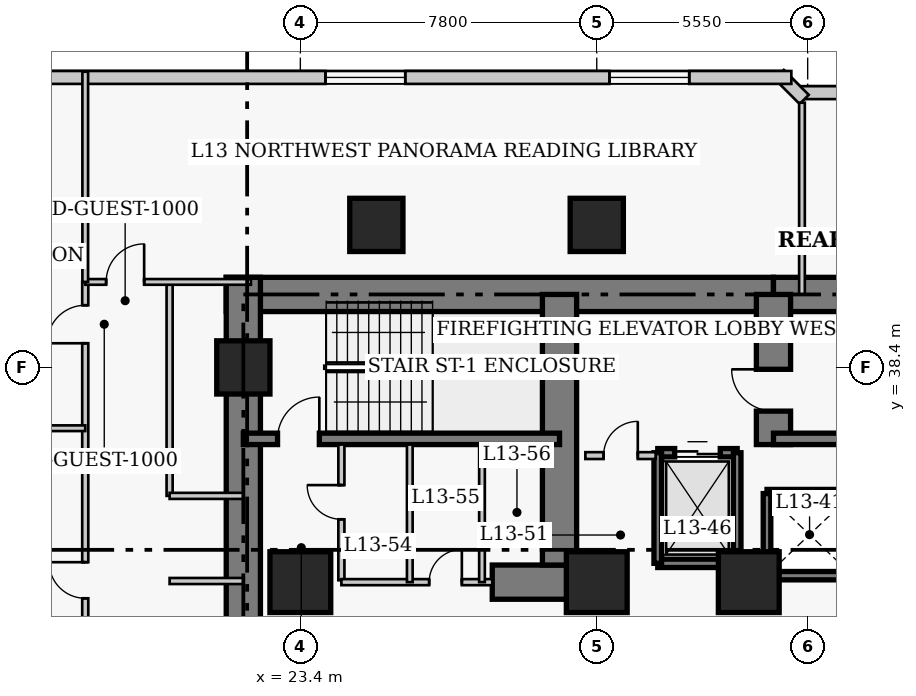
"""IFC4 building model, lengths in metres.
Left out: names, types, materials, properties, quantities, classifications, styles, units other than length and angle.
Written with IfcOpenShell. Run it as: python <this file> out.ifc"""

import sys

from ifc_helpers import new_model, si_unit, direction, frame, frame_2d, origin, origin_2d, place, context, subcontext, project, spatial, rectangle, extrude, element, fill, save


model = new_model("IFC4")
c1 = context("Model", 3, precision=1e-05, world=origin(), true_north=direction((0.0, 1.0)))
c2 = subcontext(c1, "Body", "Model", "MODEL_VIEW")
j1 = project(units=[si_unit("LENGTHUNIT", "METRE"), si_unit("PLANEANGLEUNIT", "RADIAN")], contexts=[c1])
p1 = place(None, origin())
s1 = spatial("IfcSite", under=j1, at=p1, CompositionType="ELEMENT")
p2 = place(p1, origin())
s2 = spatial("IfcBuilding", under=s1, at=p2, CompositionType="ELEMENT")
p3 = place(p2, frame((0.0, 0.0, 56.4)))
s3 = spatial("IfcBuildingStorey", under=s2, at=p3, CompositionType="ELEMENT", Elevation=56.4)
p4 = place(p3, frame((21.45, 40.32, 0.0), z_axis=(0.0, 0.0, 1.0), x_axis=(1.0, 0.0, 0.0)))
e1 = element("IfcWall", 1, at=p4, inside=s3, PredefinedType="SHEAR", context=c2, shape_type="SweptSolid", body=[
    extrude(rectangle(XDim=14.4, YDim=0.9, at=frame_2d((7.2, 0.0))), origin(), (0.0, 0.0, 1.0), 3.8),
])
p5 = place(p3, frame((35.85, 40.32, 0.0), z_axis=(0.0, 0.0, 1.0), x_axis=(1.0, 0.0, 0.0)))
e2 = element("IfcWall", 2, at=p5, inside=s3, PredefinedType="SHEAR", context=c2, shape_type="SweptSolid", body=[
    extrude(rectangle(XDim=12.6, YDim=0.9, at=frame_2d((6.3, 0.0))), origin(), (0.0, 0.0, 1.0), 3.8),
])
p6 = place(p3, frame((21.9, 27.05, 0.0), z_axis=(0.0, 0.0, 1.0), x_axis=(0.0, 1.0, 0.0)))
e3 = element("IfcWall", 3, at=p6, inside=s3, PredefinedType="SHEAR", context=c2, shape_type="SweptSolid", body=[
    extrude(rectangle(XDim=13.72, YDim=0.9, at=frame_2d((6.86, 0.0))), origin(), (0.0, 0.0, 1.0), 3.8),
])
p7 = place(p3, frame((28.45, 32.75, 0.0), z_axis=(0.0, 0.0, 1.0), x_axis=(1.0, 0.0, 0.0)))
e4 = element("IfcWall", 4, at=p7, inside=s3, PredefinedType="SHEAR", context=c2, shape_type="SweptSolid", body=[
    extrude(rectangle(XDim=2.4, YDim=0.9, at=frame_2d((1.2, 0.0))), origin(), (0.0, 0.0, 1.0), 3.8),
])
p8 = place(p3, frame((30.22, 33.2, 0.0), z_axis=(0.0, 0.0, 1.0), x_axis=(0.0, 1.0, 0.0)))
e5 = element("IfcWall", 5, at=p8, inside=s3, PredefinedType="SHEAR", context=c2, shape_type="SweptSolid", body=[
    extrude(rectangle(XDim=7.12, YDim=0.9, at=frame_2d((3.56, 0.0))), origin(), (0.0, 0.0, 1.0), 3.8),
])
p9 = place(p3, frame((35.85, 36.37, 0.0), z_axis=(0.0, 0.0, 1.0), x_axis=(0.0, 1.0, 0.0)))
e6 = element("IfcWall", 6, at=p9, inside=s3, PredefinedType="SHEAR", context=c2, shape_type="SweptSolid", body=[
    extrude(rectangle(XDim=3.95, YDim=0.9, at=frame_2d((1.975, 0.0))), origin(), (0.0, 0.0, 1.0), 3.8),
])
p10 = place(p9, frame((0.88, 0.0, 0.0)))
e7 = element("IfcOpeningElement", 7, at=p10, cuts=e6, PredefinedType="OPENING", context=c2, shape_type="SweptSolid", body=[
    extrude(rectangle(XDim=1.1, YDim=2.15, at=frame_2d((0.55, 1.075))), frame((0.0, 0.46, 0.0), z_axis=(0.0, -1.0, 0.0), x_axis=(1.0, 0.0, 0.0)), (0.0, 0.0, 1.0), 0.92),
])
p11 = place(p3, frame((21.9, 36.52, 0.0), z_axis=(0.0, 0.0, 1.0), x_axis=(1.0, 0.0, 0.0)))
e8 = element("IfcWall", 8, at=p11, inside=s3, PredefinedType="SHEAR", context=c2, shape_type="SweptSolid", body=[
    extrude(rectangle(XDim=8.32, YDim=0.3, at=frame_2d((4.16, 0.0))), origin(), (0.0, 0.0, 1.0), 3.8),
])
p12 = place(p11, frame((0.9, 0.0, 0.0)))
e9 = element("IfcOpeningElement", 9, at=p12, cuts=e8, PredefinedType="OPENING", context=c2, shape_type="SweptSolid", body=[
    extrude(rectangle(XDim=1.1, YDim=2.15, at=frame_2d((0.55, 1.075))), frame((0.0, 0.16, 0.0), z_axis=(0.0, -1.0, 0.0), x_axis=(1.0, 0.0, 0.0)), (0.0, 0.0, 1.0), 0.32),
])
p13 = place(p3, frame((35.85, 36.52, 0.0), z_axis=(0.0, 0.0, 1.0), x_axis=(1.0, 0.0, 0.0)))
e10 = element("IfcWall", 10, at=p13, inside=s3, PredefinedType="SHEAR", context=c2, shape_type="SweptSolid", body=[
    extrude(rectangle(XDim=8.33, YDim=0.3, at=frame_2d((4.165, 0.0))), origin(), (0.0, 0.0, 1.0), 3.8),
])
p14 = place(p3, frame((21.9, 38.4, 0.0), z_axis=(0.0, 0.0, 1.0), x_axis=(1.0, 0.0, 0.0)))
e11 = element("IfcColumn", 11, at=p14, inside=s3, PredefinedType="COLUMN", context=c2, shape_type="SweptSolid", body=[
    extrude(rectangle(XDim=1.4, YDim=1.4, at=origin_2d()), origin(), (0.0, 0.0, 1.0), 3.8),
])
for number, where, z_axis, x_axis in (
    (12, (23.4, 32.75, 0.0), (0.0, 0.0, 1.0), (1.0, 0.0, 0.0)),
    (13, (31.2, 32.75, 0.0), (0.0, 0.0, 1.0), (1.0, 0.0, 0.0)),
    (14, (35.2, 32.75, 0.0), (0.0, 0.0, 1.0), (1.0, 0.0, 0.0)),
):
    element("IfcColumn", number, at=place(p3, frame(where, z_axis=z_axis, x_axis=x_axis)), inside=s3, PredefinedType="COLUMN", context=c2, shape_type="SweptSolid", body=[
        extrude(rectangle(XDim=1.6, YDim=1.6, at=origin_2d()), origin(), (0.0, 0.0, 1.0), 3.8),
    ])
for number, where, z_axis, x_axis in (
    (15, (25.4, 42.15, 0.0), (0.0, 0.0, 1.0), (1.0, 0.0, 0.0)),
    (16, (31.2, 42.15, 0.0), (0.0, 0.0, 1.0), (1.0, 0.0, 0.0)),
):
    element("IfcColumn", number, at=place(p3, frame(where, z_axis=z_axis, x_axis=x_axis)), inside=s3, PredefinedType="COLUMN", context=c2, shape_type="SweptSolid", body=[
        extrude(rectangle(XDim=1.4, YDim=1.4, at=origin_2d()), origin(), (0.0, 0.0, 1.0), 3.8),
    ])
p15 = place(p3, frame((41.42, 45.63, 0.0), z_axis=(0.0, 0.0, 1.0), x_axis=(-1.0, 0.0, 0.0)))
e17 = element("IfcWall", 17, at=p15, inside=s3, PredefinedType="SOLIDWALL", context=c2, shape_type="SweptSolid", body=[
    extrude(rectangle(XDim=4.84, YDim=0.34, at=frame_2d((2.42, 0.0))), origin(), (0.0, 0.0, 1.0), 3.54),
])
p16 = place(p15, frame((1.37, 0.0, 0.85)))
e18 = element("IfcOpeningElement", 18, at=p16, cuts=e17, PredefinedType="OPENING", context=c2, shape_type="SweptSolid", body=[
    extrude(rectangle(XDim=2.1, YDim=1.85, at=frame_2d((1.05, 0.925))), frame((0.0, 0.18, 0.0), z_axis=(0.0, -1.0, 0.0), x_axis=(1.0, 0.0, 0.0)), (0.0, 0.0, 1.0), 0.36),
])
p17 = place(p3, frame((36.658, 45.451, 0.0), z_axis=(0.0, 0.0, 1.0), x_axis=(-0.707106781187, 0.707106781187, 0.0)))
e19 = element("IfcWall", 19, at=p17, inside=s3, PredefinedType="SOLIDWALL", context=c2, shape_type="SweptSolid", body=[
    extrude(rectangle(XDim=0.929, YDim=0.34, at=frame_2d((0.464, 0.0))), origin(), (0.0, 0.0, 1.0), 3.54),
])
p18 = place(p3, frame((36.32, 46.03, 0.0), z_axis=(0.0, 0.0, 1.0), x_axis=(-1.0, 0.0, 0.0)))
e20 = element("IfcWall", 20, at=p18, inside=s3, PredefinedType="SOLIDWALL", context=c2, shape_type="SweptSolid", body=[
    extrude(rectangle(XDim=29.89, YDim=0.34, at=frame_2d((14.945, 0.0))), origin(), (0.0, 0.0, 1.0), 3.54),
])
p19 = place(p18, frame((2.686, 0.0, 0.85)))
e21 = element("IfcOpeningElement", 21, at=p19, cuts=e20, PredefinedType="OPENING", context=c2, shape_type="SweptSolid", body=[
    extrude(rectangle(XDim=2.1, YDim=1.85, at=frame_2d((1.05, 0.925))), frame((0.0, 0.18, 0.0), z_axis=(0.0, -1.0, 0.0), x_axis=(1.0, 0.0, 0.0)), (0.0, 0.0, 1.0), 0.36),
])
p20 = place(p18, frame((10.159, 0.0, 0.85)))
e22 = element("IfcOpeningElement", 22, at=p20, cuts=e20, PredefinedType="OPENING", context=c2, shape_type="SweptSolid", body=[
    extrude(rectangle(XDim=2.1, YDim=1.85, at=frame_2d((1.05, 0.925))), frame((0.0, 0.18, 0.0), z_axis=(0.0, -1.0, 0.0), x_axis=(1.0, 0.0, 0.0)), (0.0, 0.0, 1.0), 0.36),
])
p21 = place(p18, frame((25.104, 0.0, 0.85)))
e23 = element("IfcOpeningElement", 23, at=p21, cuts=e20, PredefinedType="OPENING", context=c2, shape_type="SweptSolid", body=[
    extrude(rectangle(XDim=2.1, YDim=1.85, at=frame_2d((1.05, 0.925))), frame((0.0, 0.18, 0.0), z_axis=(0.0, -1.0, 0.0), x_axis=(1.0, 0.0, 0.0)), (0.0, 0.0, 1.0), 0.36),
])
for number, where, z_axis, x_axis in (
    (24, (35.68, 35.08, 0.0), (0.0, 0.0, 1.0), (1.0, 0.0, 0.0)),
    (25, (35.68, 32.92, 0.0), (0.0, 0.0, 1.0), (1.0, 0.0, 0.0)),
):
    element("IfcWall", number, at=place(p3, frame(where, z_axis=z_axis, x_axis=x_axis)), inside=s3, PredefinedType="SHEAR", context=c2, shape_type="SweptSolid", body=[
        extrude(rectangle(XDim=2.32, YDim=0.22, at=frame_2d((1.16, 0.0))), origin(), (0.0, 0.0, 1.0), 3.8),
    ])
p22 = place(p3, frame((35.68, 32.92, 0.0), z_axis=(0.0, 0.0, 1.0), x_axis=(0.0, 1.0, 0.0)))
e26 = element("IfcWall", 26, at=p22, inside=s3, PredefinedType="SHEAR", context=c2, shape_type="SweptSolid", body=[
    extrude(rectangle(XDim=2.16, YDim=0.2, at=frame_2d((1.08, 0.0))), origin(), (0.0, 0.0, 1.0), 3.8),
])
p23 = place(p3, frame((32.805, 36.155, 0.0), z_axis=(0.0, 0.0, 1.0), x_axis=(1.0, 0.0, 0.0)))
e27 = element("IfcWall", 27, at=p23, inside=s3, PredefinedType="SHEAR", context=c2, shape_type="SweptSolid", body=[
    extrude(rectangle(XDim=2.09, YDim=0.22, at=frame_2d((1.045, 0.0))), origin(), (0.0, 0.0, 1.0), 3.8),
])
p24 = place(p23, frame((0.445, 0.0, 0.0)))
e28 = element("IfcOpeningElement", 28, at=p24, cuts=e27, PredefinedType="OPENING", context=c2, shape_type="SweptSolid", body=[
    extrude(rectangle(XDim=1.2, YDim=2.15, at=frame_2d((0.6, 1.075))), frame((0.0, 0.12, 0.0), z_axis=(0.0, -1.0, 0.0), x_axis=(1.0, 0.0, 0.0)), (0.0, 0.0, 1.0), 0.24),
])
p25 = place(p3, frame((32.805, 33.245, 0.0), z_axis=(0.0, 0.0, 1.0), x_axis=(1.0, 0.0, 0.0)))
e29 = element("IfcWall", 29, at=p25, inside=s3, PredefinedType="SHEAR", context=c2, shape_type="SweptSolid", body=[
    extrude(rectangle(XDim=2.09, YDim=0.22, at=frame_2d((1.045, 0.0))), origin(), (0.0, 0.0, 1.0), 3.8),
])
for number, where, z_axis, x_axis in (
    (30, (32.805, 33.245, 0.0), (0.0, 0.0, 1.0), (0.0, 1.0, 0.0)),
    (31, (34.895, 33.245, 0.0), (0.0, 0.0, 1.0), (0.0, 1.0, 0.0)),
):
    element("IfcWall", number, at=place(p3, frame(where, z_axis=z_axis, x_axis=x_axis)), inside=s3, PredefinedType="SHEAR", context=c2, shape_type="SweptSolid", body=[
        extrude(rectangle(XDim=2.91, YDim=0.2, at=frame_2d((1.455, 0.0))), origin(), (0.0, 0.0, 1.0), 3.8),
    ])
p26 = place(p3, frame((30.9, 36.08, 0.0), z_axis=(0.0, 0.0, 1.0), x_axis=(1.0, 0.0, 0.0)))
e32 = element("IfcWall", 32, at=p26, inside=s3, PredefinedType="PARTITIONING", context=c2, shape_type="SweptSolid", body=[
    extrude(rectangle(XDim=1.85, YDim=0.18, at=frame_2d((0.925, 0.0))), origin(), (0.0, 0.0, 1.0), 3.54),
])
p27 = place(p26, frame((0.48, 0.0, 0.0)))
e33 = element("IfcOpeningElement", 33, at=p27, cuts=e32, PredefinedType="OPENING", context=c2, shape_type="SweptSolid", body=[
    extrude(rectangle(XDim=0.9, YDim=2.15, at=frame_2d((0.45, 1.075))), frame((0.0, 0.1, 0.0), z_axis=(0.0, -1.0, 0.0), x_axis=(1.0, 0.0, 0.0)), (0.0, 0.0, 1.0), 0.2),
])
p28 = place(p3, frame((24.48, 32.8, 0.0), z_axis=(0.0, 0.0, 1.0), x_axis=(0.0, 1.0, 0.0)))
e34 = element("IfcWall", 34, at=p28, inside=s3, PredefinedType="PARTITIONING", context=c2, shape_type="SweptSolid", body=[
    extrude(rectangle(XDim=3.57, YDim=0.16, at=frame_2d((1.785, 0.0))), origin(), (0.0, 0.0, 1.0), 3.54),
])
p29 = place(p28, frame((1.604, 0.0, 0.0)))
e35 = element("IfcOpeningElement", 35, at=p29, cuts=e34, PredefinedType="OPENING", context=c2, shape_type="SweptSolid", body=[
    extrude(rectangle(XDim=0.9, YDim=2.1, at=frame_2d((0.45, 1.05))), frame((0.0, 0.09, 0.0), z_axis=(0.0, -1.0, 0.0), x_axis=(1.0, 0.0, 0.0)), (0.0, 0.0, 1.0), 0.18),
])
p30 = place(p3, frame((24.48, 32.75, 0.0), z_axis=(0.0, 0.0, 1.0), x_axis=(1.0, 0.0, 0.0)))
e36 = element("IfcWall", 36, at=p30, inside=s3, PredefinedType="PARTITIONING", context=c2, shape_type="SweptSolid", body=[
    extrude(rectangle(XDim=3.97, YDim=0.16, at=frame_2d((1.985, 0.0))), origin(), (0.0, 0.0, 1.0), 3.54),
])
p31 = place(p30, frame((2.31, 0.0, 0.0)))
e37 = element("IfcOpeningElement", 37, at=p31, cuts=e36, PredefinedType="OPENING", context=c2, shape_type="SweptSolid", body=[
    extrude(rectangle(XDim=0.86, YDim=2.05, at=frame_2d((0.43, 1.025))), frame((0.0, 0.09, 0.0), z_axis=(0.0, -1.0, 0.0), x_axis=(1.0, 0.0, 0.0)), (0.0, 0.0, 1.0), 0.18),
])
for number, where, z_axis, x_axis in (
    (38, (26.28, 32.75, 0.0), (0.0, 0.0, 1.0), (0.0, 1.0, 0.0)),
    (39, (28.18, 32.75, 0.0), (0.0, 0.0, 1.0), (0.0, 1.0, 0.0)),
):
    element("IfcWall", number, at=place(p3, frame(where, z_axis=z_axis, x_axis=x_axis)), inside=s3, PredefinedType="PARTITIONING", context=c2, shape_type="SweptSolid", body=[
        extrude(rectangle(XDim=3.62, YDim=0.15, at=frame_2d((1.81, 0.0))), origin(), (0.0, 0.0, 1.0), 3.54),
    ])
p32 = place(p3, frame((17.74, 5.05, 0.0), z_axis=(0.0, 0.0, 1.0), x_axis=(0.0, 1.0, 0.0)))
e40 = element("IfcWall", 40, at=p32, inside=s3, PredefinedType="PARTITIONING", context=c2, shape_type="SweptSolid", body=[
    extrude(rectangle(XDim=35.6, YDim=0.16, at=frame_2d((17.8, 0.0))), origin(), (0.0, 0.0, 1.0), 3.54),
])
p33 = place(p32, frame((2.6, 0.0, 0.0)))
e41 = element("IfcOpeningElement", 41, at=p33, cuts=e40, PredefinedType="OPENING", context=c2, shape_type="SweptSolid", body=[
    extrude(rectangle(XDim=0.95, YDim=2.1, at=frame_2d((0.475, 1.05))), frame((0.0, 0.09, 0.0), z_axis=(0.0, -1.0, 0.0), x_axis=(1.0, 0.0, 0.0)), (0.0, 0.0, 1.0), 0.18),
])
p34 = place(p32, frame((10.075, 0.0, 0.0)))
e42 = element("IfcOpeningElement", 42, at=p34, cuts=e40, PredefinedType="OPENING", context=c2, shape_type="SweptSolid", body=[
    extrude(rectangle(XDim=0.95, YDim=2.1, at=frame_2d((0.475, 1.05))), frame((0.0, 0.09, 0.0), z_axis=(0.0, -1.0, 0.0), x_axis=(1.0, 0.0, 0.0)), (0.0, 0.0, 1.0), 0.18),
])
p35 = place(p32, frame((18.875, 0.0, 0.0)))
e43 = element("IfcOpeningElement", 43, at=p35, cuts=e40, PredefinedType="OPENING", context=c2, shape_type="SweptSolid", body=[
    extrude(rectangle(XDim=0.95, YDim=2.1, at=frame_2d((0.475, 1.05))), frame((0.0, 0.09, 0.0), z_axis=(0.0, -1.0, 0.0), x_axis=(1.0, 0.0, 0.0)), (0.0, 0.0, 1.0), 0.18),
])
p36 = place(p32, frame((27.275, 0.0, 0.0)))
e44 = element("IfcOpeningElement", 44, at=p36, cuts=e40, PredefinedType="OPENING", context=c2, shape_type="SweptSolid", body=[
    extrude(rectangle(XDim=0.95, YDim=2.1, at=frame_2d((0.475, 1.05))), frame((0.0, 0.09, 0.0), z_axis=(0.0, -1.0, 0.0), x_axis=(1.0, 0.0, 0.0)), (0.0, 0.0, 1.0), 0.18),
])
p37 = place(p32, frame((33.986, 0.0, 0.0)))
e45 = element("IfcOpeningElement", 45, at=p37, cuts=e40, PredefinedType="OPENING", context=c2, shape_type="SweptSolid", body=[
    extrude(rectangle(XDim=1.0, YDim=2.15, at=frame_2d((0.5, 1.075))), frame((0.0, 0.09, 0.0), z_axis=(0.0, -1.0, 0.0), x_axis=(1.0, 0.0, 0.0)), (0.0, 0.0, 1.0), 0.18),
])
p38 = place(p3, frame((19.96, 35.02, 0.0), z_axis=(0.0, 0.0, 1.0), x_axis=(0.0, 1.0, 0.0)))
e46 = element("IfcWall", 46, at=p38, inside=s3, PredefinedType="PARTITIONING", context=c2, shape_type="SweptSolid", body=[
    extrude(rectangle(XDim=5.63, YDim=0.16, at=frame_2d((2.815, 0.0))), origin(), (0.0, 0.0, 1.0), 3.54),
])
for number, where, z_axis, x_axis in (
    (47, (19.96, 35.02, 0.0), (0.0, 0.0, 1.0), (1.0, 0.0, 0.0)),
    (48, (19.96, 32.78, 0.0), (0.0, 0.0, 1.0), (1.0, 0.0, 0.0)),
):
    element("IfcWall", number, at=place(p3, frame(where, z_axis=z_axis, x_axis=x_axis)), inside=s3, PredefinedType="PARTITIONING", context=c2, shape_type="SweptSolid", body=[
        extrude(rectangle(XDim=1.94, YDim=0.16, at=frame_2d((0.97, 0.0))), origin(), (0.0, 0.0, 1.0), 3.54),
    ])
p39 = place(p3, frame((17.74, 40.65, 0.0), z_axis=(0.0, 0.0, 1.0), x_axis=(1.0, 0.0, 0.0)))
e49 = element("IfcWall", 49, at=p39, inside=s3, PredefinedType="PARTITIONING", context=c2, shape_type="SweptSolid", body=[
    extrude(rectangle(XDim=4.36, YDim=0.15, at=frame_2d((2.18, 0.0))), origin(), (0.0, 0.0, 1.0), 3.54),
])
p40 = place(p39, frame((0.55, 0.0, 0.0)))
e50 = element("IfcOpeningElement", 50, at=p40, cuts=e49, PredefinedType="OPENING", context=c2, shape_type="SweptSolid", body=[
    extrude(rectangle(XDim=1.0, YDim=2.15, at=frame_2d((0.5, 1.075))), frame((0.0, 0.085, 0.0), z_axis=(0.0, -1.0, 0.0), x_axis=(1.0, 0.0, 0.0)), (0.0, 0.0, 1.0), 0.17),
])
p41 = place(p3, frame((17.74, 40.65, 0.0), z_axis=(0.0, 0.0, 1.0), x_axis=(0.0, 1.0, 0.0)))
e51 = element("IfcWall", 51, at=p41, inside=s3, PredefinedType="PARTITIONING", context=c2, shape_type="SweptSolid", body=[
    extrude(rectangle(XDim=5.53, YDim=0.15, at=frame_2d((2.765, 0.0))), origin(), (0.0, 0.0, 1.0), 3.54),
])
p42 = place(p3, frame((36.6, 40.32, 0.0), z_axis=(0.0, 0.0, 1.0), x_axis=(0.0, 1.0, 0.0)))
e52 = element("IfcWall", 52, at=p42, inside=s3, PredefinedType="PARTITIONING", context=c2, shape_type="SweptSolid", body=[
    extrude(rectangle(XDim=5.045, YDim=0.15, at=frame_2d((2.522, 0.0))), origin(), (0.0, 0.0, 1.0), 3.54),
])
p43 = place(p3, frame((14.45, 36.8, 0.0), z_axis=(0.0, 0.0, 1.0), x_axis=(1.0, 0.0, 0.0)))
e53 = element("IfcWall", 53, at=p43, inside=s3, PredefinedType="PARTITIONING", context=c2, shape_type="SweptSolid", body=[
    extrude(rectangle(XDim=3.29, YDim=0.15, at=frame_2d((1.645, 0.0))), origin(), (0.0, 0.0, 1.0), 3.54),
])
p44 = place(p19, origin())
e54 = element("IfcWindow", 54, at=p44, inside=s3, PartitioningType="SINGLE_PANEL", PredefinedType="WINDOW", context=c2, shape_type="SweptSolid", body=[
    extrude(rectangle(XDim=2.1, YDim=1.85, at=frame_2d((1.05, 0.925))), frame((0.0, 0.03, 0.0), z_axis=(0.0, -1.0, 0.0), x_axis=(1.0, 0.0, 0.0)), (0.0, 0.0, 1.0), 0.06),
])
fill(e21, e54)
p45 = place(p20, origin())
e55 = element("IfcWindow", 55, at=p45, inside=s3, PartitioningType="SINGLE_PANEL", PredefinedType="WINDOW", context=c2, shape_type="SweptSolid", body=[
    extrude(rectangle(XDim=2.1, YDim=1.85, at=frame_2d((1.05, 0.925))), frame((0.0, 0.03, 0.0), z_axis=(0.0, -1.0, 0.0), x_axis=(1.0, 0.0, 0.0)), (0.0, 0.0, 1.0), 0.06),
])
fill(e22, e55)
p46 = place(p24, origin())
e56 = element("IfcDoor", 56, at=p46, inside=s3, OperationType="DOUBLE_DOOR_SLIDING", PredefinedType="DOOR", context=c2, shape_type="SweptSolid", body=[
    extrude(rectangle(XDim=1.2, YDim=2.15, at=frame_2d((0.6, 1.075))), frame((0.0, 0.025, 0.0), z_axis=(0.0, -1.0, 0.0), x_axis=(1.0, 0.0, 0.0)), (0.0, 0.0, 1.0), 0.05),
])
fill(e28, e56)
p47 = place(p27, origin())
e57 = element("IfcDoor", 57, at=p47, inside=s3, OperationType="SINGLE_SWING_RIGHT", PredefinedType="DOOR", context=c2, shape_type="SweptSolid", body=[
    extrude(rectangle(XDim=0.9, YDim=2.15, at=frame_2d((0.45, 1.075))), frame((0.0, 0.025, 0.0), z_axis=(0.0, -1.0, 0.0), x_axis=(1.0, 0.0, 0.0)), (0.0, 0.0, 1.0), 0.05),
])
fill(e33, e57)
p48 = place(p29, origin())
e58 = element("IfcDoor", 58, at=p48, inside=s3, OperationType="SINGLE_SWING_RIGHT", PredefinedType="DOOR", context=c2, shape_type="SweptSolid", body=[
    extrude(rectangle(XDim=0.9, YDim=2.1, at=frame_2d((0.45, 1.05))), frame((0.0, 0.025, 0.0), z_axis=(0.0, -1.0, 0.0), x_axis=(1.0, 0.0, 0.0)), (0.0, 0.0, 1.0), 0.05),
])
fill(e35, e58)
p49 = place(p31, origin())
e59 = element("IfcDoor", 59, at=p49, inside=s3, OperationType="SINGLE_SWING_RIGHT", PredefinedType="DOOR", context=c2, shape_type="SweptSolid", body=[
    extrude(rectangle(XDim=0.86, YDim=2.05, at=frame_2d((0.43, 1.025))), frame((0.0, 0.025, 0.0), z_axis=(0.0, -1.0, 0.0), x_axis=(1.0, 0.0, 0.0)), (0.0, 0.0, 1.0), 0.05),
])
fill(e37, e59)
p50 = place(p40, origin())
e60 = element("IfcDoor", 60, at=p50, inside=s3, OperationType="SINGLE_SWING_RIGHT", PredefinedType="DOOR", context=c2, shape_type="SweptSolid", body=[
    extrude(rectangle(XDim=1.0, YDim=2.15, at=frame_2d((0.5, 1.075))), frame((0.0, 0.025, 0.0), z_axis=(0.0, -1.0, 0.0), x_axis=(1.0, 0.0, 0.0)), (0.0, 0.0, 1.0), 0.05),
])
fill(e50, e60)
p51 = place(p36, origin())
e61 = element("IfcDoor", 61, at=p51, inside=s3, OperationType="SINGLE_SWING_RIGHT", PredefinedType="DOOR", context=c2, shape_type="SweptSolid", body=[
    extrude(rectangle(XDim=0.95, YDim=2.1, at=frame_2d((0.475, 1.05))), frame((0.0, 0.025, 0.0), z_axis=(0.0, -1.0, 0.0), x_axis=(1.0, 0.0, 0.0)), (0.0, 0.0, 1.0), 0.05),
])
fill(e44, e61)
p52 = place(p37, origin())
e62 = element("IfcDoor", 62, at=p52, inside=s3, OperationType="SINGLE_SWING_LEFT", PredefinedType="DOOR", context=c2, shape_type="SweptSolid", body=[
    extrude(rectangle(XDim=1.0, YDim=2.15, at=frame_2d((0.5, 1.075))), frame((0.0, 0.025, 0.0), z_axis=(0.0, -1.0, 0.0), x_axis=(1.0, 0.0, 0.0)), (0.0, 0.0, 1.0), 0.05),
])
fill(e45, e62)
p53 = place(p12, origin())
e63 = element("IfcDoor", 63, at=p53, inside=s3, OperationType="SINGLE_SWING_RIGHT", PredefinedType="DOOR", context=c2, shape_type="SweptSolid", body=[
    extrude(rectangle(XDim=1.1, YDim=2.15, at=frame_2d((0.55, 1.075))), frame((0.0, 0.025, 0.0), z_axis=(0.0, -1.0, 0.0), x_axis=(1.0, 0.0, 0.0)), (0.0, 0.0, 1.0), 0.05),
])
fill(e9, e63)
p54 = place(p10, origin())
e64 = element("IfcDoor", 64, at=p54, inside=s3, OperationType="SINGLE_SWING_RIGHT", PredefinedType="DOOR", context=c2, shape_type="SweptSolid", body=[
    extrude(rectangle(XDim=1.1, YDim=2.15, at=frame_2d((0.55, 1.075))), frame((0.0, 0.025, 0.0), z_axis=(0.0, -1.0, 0.0), x_axis=(1.0, 0.0, 0.0)), (0.0, 0.0, 1.0), 0.05),
])
fill(e7, e64)
save(model, sys.argv[1])
